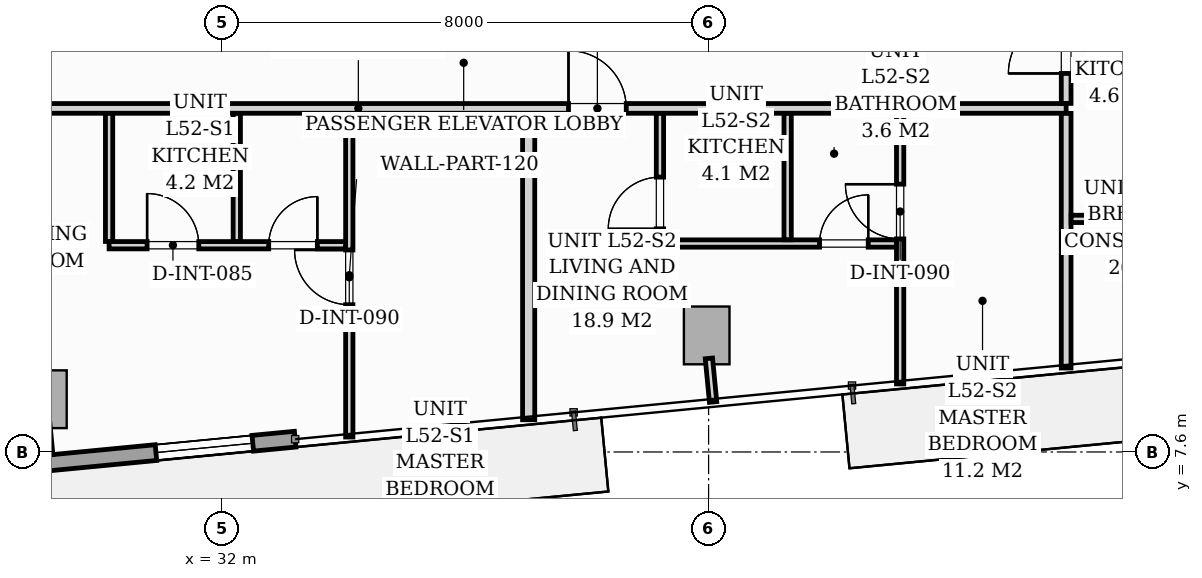
"""IFC4 building model, lengths in metres.
Left out: names, types, materials, properties, quantities, classifications, styles, units other than length and angle.
Written with IfcOpenShell. Run it as: python <this file> out.ifc"""

import sys

from ifc_helpers import new_model, si_unit, direction, frame, frame_2d, origin, origin_2d, place, context, subcontext, project, spatial, rectangle, extrude, source, transform, mapped, element, fill, save


model = new_model("IFC4")
c1 = context("Model", 3, precision=1e-05, world=origin(), true_north=direction((0.0, 1.0)))
c2 = subcontext(c1, "Body", "Model", "MODEL_VIEW")
j1 = project(units=[si_unit("LENGTHUNIT", "METRE"), si_unit("PLANEANGLEUNIT", "RADIAN")], contexts=[c1])
p1 = place(None, origin())
s1 = spatial("IfcSite", under=j1, at=p1, CompositionType="ELEMENT")
p2 = place(p1, origin())
s2 = spatial("IfcBuilding", under=s1, at=p2, CompositionType="ELEMENT")
p3 = place(p2, frame((0.0, 0.0, 182.6)))
s3 = spatial("IfcBuildingStorey", under=s2, at=p3, CompositionType="ELEMENT", Elevation=182.6)
m1 = source(origin(), c2, "Body", "SweptSolid", [
    extrude(rectangle(XDim=0.75, YDim=0.95, at=origin_2d()), origin(), (0.0, 0.0, 1.0), 3.196),
])
for number, where, z_axis, x_axis in (
    (1, (29.069, 8.467, 0.002), (0.0, 0.0, 1.0), (0.995, 0.096, 0.0)),
    (2, (39.969, 9.517, 0.002), (0.0, 0.0, 1.0), (0.995, 0.096, 0.0)),
):
    element("IfcColumn", number, at=place(p3, frame(where, z_axis=z_axis, x_axis=x_axis)), inside=s3, PredefinedType="COLUMN", context=c2, shape_type="MappedRepresentation", body=[
        mapped(m1, transform((0.0, 0.0, 0.0), scale=1.0)),
    ])
p4 = place(p3, frame((33.201, 7.81, 0.0), z_axis=(0.0, 0.0, 1.0), x_axis=(-0.995397074604, -0.095836652014, 0.0)))
e3 = element("IfcWall", 3, at=p4, inside=s3, PredefinedType="STANDARD", context=c2, shape_type="SweptSolid", body=[
    extrude(rectangle(XDim=16.1, YDim=0.26, at=frame_2d((8.05, 0.0))), origin(), (0.0, 0.0, 1.0), 2.94),
])
p5 = place(p4, frame((7.63, 0.0, 0.0)))
e4 = element("IfcOpeningElement", 4, at=p5, cuts=e3, PredefinedType="OPENING", context=c2, shape_type="SweptSolid", body=[
    extrude(rectangle(XDim=1.8, YDim=2.06, at=frame_2d((0.9, 1.03))), frame((0.0, 0.14, 0.0), z_axis=(0.0, -1.0, 0.0), x_axis=(1.0, 0.0, 0.0)), (0.0, 0.0, 1.0), 0.28),
])
p6 = place(p4, frame((0.7, 0.0, 0.65)))
e5 = element("IfcOpeningElement", 5, at=p6, cuts=e3, PredefinedType="OPENING", context=c2, shape_type="SweptSolid", body=[
    extrude(rectangle(XDim=1.6, YDim=1.5, at=frame_2d((0.8, 0.75))), frame((0.0, 0.14, 0.0), z_axis=(0.0, -1.0, 0.0), x_axis=(1.0, 0.0, 0.0)), (0.0, 0.0, 1.0), 0.28),
])
p7 = place(p3, frame((22.6, 13.25, 0.0), z_axis=(0.0, 0.0, 1.0), x_axis=(1.0, 0.0, 0.0)))
e6 = element("IfcWall", 6, at=p7, inside=s3, PredefinedType="PARTITIONING", context=c2, shape_type="SweptSolid", body=[
    extrude(rectangle(XDim=23.28, YDim=0.16, at=frame_2d((11.64, 0.0))), origin(), (0.0, 0.0, 1.0), 2.94),
])
p8 = place(p7, frame((3.335, 0.0, 0.0)))
e7 = element("IfcOpeningElement", 7, at=p8, cuts=e6, PredefinedType="OPENING", context=c2, shape_type="SweptSolid", body=[
    extrude(rectangle(XDim=0.95, YDim=2.06, at=frame_2d((0.475, 1.03))), frame((0.0, 0.09, 0.0), z_axis=(0.0, -1.0, 0.0), x_axis=(1.0, 0.0, 0.0)), (0.0, 0.0, 1.0), 0.18),
])
p9 = place(p7, frame((15.096, 0.0, 0.0)))
e8 = element("IfcOpeningElement", 8, at=p9, cuts=e6, PredefinedType="OPENING", context=c2, shape_type="SweptSolid", body=[
    extrude(rectangle(XDim=0.95, YDim=2.06, at=frame_2d((0.475, 1.03))), frame((0.0, 0.09, 0.0), z_axis=(0.0, -1.0, 0.0), x_axis=(1.0, 0.0, 0.0)), (0.0, 0.0, 1.0), 0.18),
])
p10 = place(p3, frame((45.88, 8.981, 0.0), z_axis=(0.0, 0.0, 1.0), x_axis=(0.0, 1.0, 0.0)))
e9 = element("IfcWall", 9, at=p10, inside=s3, PredefinedType="PARTITIONING", context=c2, shape_type="SweptSolid", body=[
    extrude(rectangle(XDim=4.187, YDim=0.16, at=frame_2d((2.094, 0.0))), origin(), (0.0, 0.0, 1.0), 2.94),
])
p11 = place(p3, frame((45.88, 13.332, 0.0), z_axis=(0.0, 0.0, 1.0), x_axis=(0.0, 1.0, 0.0)))
e10 = element("IfcWall", 10, at=p11, inside=s3, PredefinedType="PARTITIONING", context=c2, shape_type="SweptSolid", body=[
    extrude(rectangle(XDim=4.47, YDim=0.16, at=frame_2d((2.235, 0.0))), origin(), (0.0, 0.0, 1.0), 2.94),
])
p12 = place(p11, frame((0.493, 0.0, 0.0)))
e11 = element("IfcOpeningElement", 11, at=p12, cuts=e10, PredefinedType="OPENING", context=c2, shape_type="SweptSolid", body=[
    extrude(rectangle(XDim=0.95, YDim=2.06, at=frame_2d((0.475, 1.03))), frame((0.0, 0.09, 0.0), z_axis=(0.0, -1.0, 0.0), x_axis=(1.0, 0.0, 0.0)), (0.0, 0.0, 1.0), 0.18),
])
p13 = place(p3, frame((34.091, 7.846, 0.0), z_axis=(0.0, 0.0, 1.0), x_axis=(0.0, 1.0, 0.0)))
e12 = element("IfcWall", 12, at=p13, inside=s3, PredefinedType="PARTITIONING", context=c2, shape_type="SweptSolid", body=[
    extrude(rectangle(XDim=5.322, YDim=0.12, at=frame_2d((2.661, 0.0))), origin(), (0.0, 0.0, 1.0), 2.94),
])
p14 = place(p13, frame((2.176, 0.0, 0.0)))
e13 = element("IfcOpeningElement", 13, at=p14, cuts=e12, PredefinedType="OPENING", context=c2, shape_type="SweptSolid", body=[
    extrude(rectangle(XDim=0.9, YDim=2.05, at=frame_2d((0.45, 1.025))), frame((0.0, 0.07, 0.0), z_axis=(0.0, -1.0, 0.0), x_axis=(1.0, 0.0, 0.0)), (0.0, 0.0, 1.0), 0.14),
])
p15 = place(p3, frame((30.141, 11.0, 0.0), z_axis=(0.0, 0.0, 1.0), x_axis=(1.0, 0.0, 0.0)))
e14 = element("IfcWall", 14, at=p15, inside=s3, PredefinedType="PARTITIONING", context=c2, shape_type="SweptSolid", body=[
    extrude(rectangle(XDim=3.888, YDim=0.12, at=frame_2d((1.944, 0.0))), origin(), (0.0, 0.0, 1.0), 2.94),
])
p16 = place(p15, frame((0.625, 0.0, 0.0)))
e15 = element("IfcOpeningElement", 15, at=p16, cuts=e14, PredefinedType="OPENING", context=c2, shape_type="SweptSolid", body=[
    extrude(rectangle(XDim=0.85, YDim=2.05, at=frame_2d((0.425, 1.025))), frame((0.0, 0.07, 0.0), z_axis=(0.0, -1.0, 0.0), x_axis=(1.0, 0.0, 0.0)), (0.0, 0.0, 1.0), 0.14),
])
p17 = place(p15, frame((2.625, 0.0, 0.0)))
e16 = element("IfcOpeningElement", 16, at=p17, cuts=e14, PredefinedType="OPENING", context=c2, shape_type="SweptSolid", body=[
    extrude(rectangle(XDim=0.8, YDim=2.02, at=frame_2d((0.4, 1.01))), frame((0.0, 0.07, 0.0), z_axis=(0.0, -1.0, 0.0), x_axis=(1.0, 0.0, 0.0)), (0.0, 0.0, 1.0), 0.14),
])
for number, where, z_axis, x_axis in (
    (17, (32.241, 11.062, 0.0), (0.0, 0.0, 1.0), (0.0, 1.0, 0.0)),
    (18, (30.141, 11.062, 0.0), (0.0, 0.0, 1.0), (0.0, 1.0, 0.0)),
):
    element("IfcWall", number, at=place(p3, frame(where, z_axis=z_axis, x_axis=x_axis)), inside=s3, PredefinedType="PARTITIONING", context=c2, shape_type="SweptSolid", body=[
        extrude(rectangle(XDim=2.106, YDim=0.12, at=frame_2d((1.053, 0.0))), origin(), (0.0, 0.0, 1.0), 2.94),
    ])
p18 = place(p3, frame((37.041, 8.13, 0.0), z_axis=(0.0, 0.0, 1.0), x_axis=(0.0, 1.0, 0.0)))
e19 = element("IfcWall", 19, at=p18, inside=s3, PredefinedType="PARTITIONING", context=c2, shape_type="SweptSolid", body=[
    extrude(rectangle(XDim=5.038, YDim=0.2, at=frame_2d((2.519, 0.0))), origin(), (0.0, 0.0, 1.0), 2.94),
])
p19 = place(p3, frame((43.15, 8.718, 0.0), z_axis=(0.0, 0.0, 1.0), x_axis=(0.0, 1.0, 0.0)))
e20 = element("IfcWall", 20, at=p19, inside=s3, PredefinedType="PARTITIONING", context=c2, shape_type="SweptSolid", body=[
    extrude(rectangle(XDim=4.45, YDim=0.12, at=frame_2d((2.225, 0.0))), origin(), (0.0, 0.0, 1.0), 2.94),
])
p20 = place(p19, frame((2.386, 0.0, 0.0)))
e21 = element("IfcOpeningElement", 21, at=p20, cuts=e20, PredefinedType="OPENING", context=c2, shape_type="SweptSolid", body=[
    extrude(rectangle(XDim=0.9, YDim=2.05, at=frame_2d((0.45, 1.025))), frame((0.0, 0.07, 0.0), z_axis=(0.0, -1.0, 0.0), x_axis=(1.0, 0.0, 0.0)), (0.0, 0.0, 1.0), 0.14),
])
p21 = place(p3, frame((39.2, 11.028, 0.0), z_axis=(0.0, 0.0, 1.0), x_axis=(1.0, 0.0, 0.0)))
e22 = element("IfcWall", 22, at=p21, inside=s3, PredefinedType="PARTITIONING", context=c2, shape_type="SweptSolid", body=[
    extrude(rectangle(XDim=3.888, YDim=0.12, at=frame_2d((1.944, 0.0))), origin(), (0.0, 0.0, 1.0), 2.94),
])
p22 = place(p21, frame((2.625, 0.0, 0.0)))
e23 = element("IfcOpeningElement", 23, at=p22, cuts=e22, PredefinedType="OPENING", context=c2, shape_type="SweptSolid", body=[
    extrude(rectangle(XDim=0.8, YDim=2.02, at=frame_2d((0.4, 1.01))), frame((0.0, 0.07, 0.0), z_axis=(0.0, -1.0, 0.0), x_axis=(1.0, 0.0, 0.0)), (0.0, 0.0, 1.0), 0.14),
])
p23 = place(p3, frame((41.3, 11.09, 0.0), z_axis=(0.0, 0.0, 1.0), x_axis=(0.0, 1.0, 0.0)))
e24 = element("IfcWall", 24, at=p23, inside=s3, PredefinedType="PARTITIONING", context=c2, shape_type="SweptSolid", body=[
    extrude(rectangle(XDim=2.078, YDim=0.12, at=frame_2d((1.039, 0.0))), origin(), (0.0, 0.0, 1.0), 2.94),
])
p24 = place(p3, frame((39.2, 11.09, 0.0), z_axis=(0.0, 0.0, 1.0), x_axis=(0.0, 1.0, 0.0)))
e25 = element("IfcWall", 25, at=p24, inside=s3, PredefinedType="PARTITIONING", context=c2, shape_type="SweptSolid", body=[
    extrude(rectangle(XDim=2.078, YDim=0.12, at=frame_2d((1.039, 0.0))), origin(), (0.0, 0.0, 1.0), 2.94),
])
p25 = place(p24, frame((0.18, 0.0, 0.0)))
e26 = element("IfcOpeningElement", 26, at=p25, cuts=e25, PredefinedType="OPENING", context=c2, shape_type="SweptSolid", body=[
    extrude(rectangle(XDim=0.85, YDim=2.05, at=frame_2d((0.425, 1.025))), frame((0.0, 0.07, 0.0), z_axis=(0.0, -1.0, 0.0), x_axis=(1.0, 0.0, 0.0)), (0.0, 0.0, 1.0), 0.14),
])
p26 = place(p3, frame((45.962, 11.433, 0.0), z_axis=(0.0, 0.0, 1.0), x_axis=(1.0, 0.0, 0.0)))
e27 = element("IfcWall", 27, at=p26, inside=s3, PredefinedType="PARTITIONING", context=c2, shape_type="SweptSolid", body=[
    extrude(rectangle(XDim=16.666, YDim=0.12, at=frame_2d((8.333, 0.0))), origin(), (0.0, 0.0, 1.0), 2.382),
])
p27 = place(p26, frame((6.186, 0.0, 0.0)))
e28 = element("IfcOpeningElement", 28, at=p27, cuts=e27, PredefinedType="OPENING", context=c2, shape_type="SweptSolid", body=[
    extrude(rectangle(XDim=0.85, YDim=2.05, at=frame_2d((0.425, 1.025))), frame((0.0, 0.07, 0.0), z_axis=(0.0, -1.0, 0.0), x_axis=(1.0, 0.0, 0.0)), (0.0, 0.0, 1.0), 0.14),
])
p28 = place(p3, frame((29.105, 8.089, 0.0), z_axis=(0.0, 0.0, 1.0), x_axis=(0.095772948675, -0.995403205893, 0.0)))
e29 = element("IfcWall", 29, at=p28, inside=s3, PredefinedType="PARTITIONING", context=c2, shape_type="SweptSolid", body=[
    extrude(rectangle(XDim=0.538, YDim=0.12, at=frame_2d((0.269, 0.0))), origin(), (0.0, 0.0, 1.0), 2.94),
])
p29 = place(p3, frame((40.005, 9.139, 0.0), z_axis=(0.0, 0.0, 1.0), x_axis=(0.095977354523, -0.995383517755, 0.0)))
e30 = element("IfcWall", 30, at=p29, inside=s3, PredefinedType="PARTITIONING", context=c2, shape_type="SweptSolid", body=[
    extrude(rectangle(XDim=0.72, YDim=0.12, at=frame_2d((0.36, 0.0))), origin(), (0.0, 0.0, 1.0), 2.94),
])
m2 = source(origin(), c2, "Body", "SweptSolid", [
    extrude(rectangle(XDim=1.6, YDim=1.5, at=frame_2d((0.8, 0.75))), frame((0.0, 0.03, 0.0), z_axis=(0.0, -1.0, 0.0), x_axis=(1.0, 0.0, 0.0)), (0.0, 0.0, 1.0), 0.06),
])
p30 = place(p6, origin())
e31 = element("IfcWindow", 31, at=p30, inside=s3, PartitioningType="SINGLE_PANEL", PredefinedType="WINDOW", context=c2, shape_type="MappedRepresentation", body=[
    mapped(m2, transform((0.0, 0.0, 0.0), scale=1.0)),
])
fill(e5, e31)
m3 = source(origin(), c2, "Body", "SweptSolid", [
    extrude(rectangle(XDim=0.9, YDim=2.05, at=frame_2d((0.45, 1.025))), frame((0.0, 0.025, 0.0), z_axis=(0.0, -1.0, 0.0), x_axis=(1.0, 0.0, 0.0)), (0.0, 0.0, 1.0), 0.05),
])
p31 = place(p14, origin())
e32 = element("IfcDoor", 32, at=p31, inside=s3, OperationType="SINGLE_SWING_RIGHT", PredefinedType="DOOR", context=c2, shape_type="MappedRepresentation", body=[
    mapped(m3, transform((0.0, 0.0, 0.0), scale=1.0)),
])
fill(e13, e32)
m4 = source(origin(), c2, "Body", "SweptSolid", [
    extrude(rectangle(XDim=0.85, YDim=2.05, at=frame_2d((0.425, 1.025))), frame((0.0, 0.025, 0.0), z_axis=(0.0, -1.0, 0.0), x_axis=(1.0, 0.0, 0.0)), (0.0, 0.0, 1.0), 0.05),
])
p32 = place(p16, origin())
e33 = element("IfcDoor", 33, at=p32, inside=s3, OperationType="SINGLE_SWING_LEFT", PredefinedType="DOOR", context=c2, shape_type="MappedRepresentation", body=[
    mapped(m4, transform((0.0, 0.0, 0.0), scale=1.0)),
])
fill(e15, e33)
m5 = source(origin(), c2, "Body", "SweptSolid", [
    extrude(rectangle(XDim=0.8, YDim=2.02, at=frame_2d((0.4, 1.01))), frame((0.0, 0.025, 0.0), z_axis=(0.0, -1.0, 0.0), x_axis=(1.0, 0.0, 0.0)), (0.0, 0.0, 1.0), 0.05),
])
p33 = place(p17, origin())
e34 = element("IfcDoor", 34, at=p33, inside=s3, OperationType="SINGLE_SWING_RIGHT", PredefinedType="DOOR", context=c2, shape_type="MappedRepresentation", body=[
    mapped(m5, transform((0.0, 0.0, 0.0), scale=1.0)),
])
fill(e16, e34)
m6 = source(origin(), c2, "Body", "SweptSolid", [
    extrude(rectangle(XDim=0.95, YDim=2.06, at=frame_2d((0.475, 1.03))), frame((0.0, 0.025, 0.0), z_axis=(0.0, -1.0, 0.0), x_axis=(1.0, 0.0, 0.0)), (0.0, 0.0, 1.0), 0.05),
])
p34 = place(p9, origin())
e35 = element("IfcDoor", 35, at=p34, inside=s3, OperationType="SINGLE_SWING_LEFT", PredefinedType="DOOR", context=c2, shape_type="MappedRepresentation", body=[
    mapped(m6, transform((0.0, 0.0, 0.0), scale=1.0)),
])
fill(e8, e35)
p35 = place(p20, origin())
e36 = element("IfcDoor", 36, at=p35, inside=s3, OperationType="SINGLE_SWING_RIGHT", PredefinedType="DOOR", context=c2, shape_type="MappedRepresentation", body=[
    mapped(m3, transform((0.0, 0.0, 0.0), scale=1.0)),
])
fill(e21, e36)
p36 = place(p25, origin())
e37 = element("IfcDoor", 37, at=p36, inside=s3, OperationType="SINGLE_SWING_LEFT", PredefinedType="DOOR", context=c2, shape_type="MappedRepresentation", body=[
    mapped(m4, transform((0.0, 0.0, 0.0), scale=1.0)),
])
fill(e26, e37)
p37 = place(p22, origin())
e38 = element("IfcDoor", 38, at=p37, inside=s3, OperationType="SINGLE_SWING_RIGHT", PredefinedType="DOOR", context=c2, shape_type="MappedRepresentation", body=[
    mapped(m5, transform((0.0, 0.0, 0.0), scale=1.0)),
])
fill(e23, e38)
p38 = place(p12, origin())
e39 = element("IfcDoor", 39, at=p38, inside=s3, OperationType="SINGLE_SWING_LEFT", PredefinedType="DOOR", context=c2, shape_type="MappedRepresentation", body=[
    mapped(m6, transform((0.0, 0.0, 0.0), scale=1.0)),
])
fill(e11, e39)
save(model, sys.argv[1])
